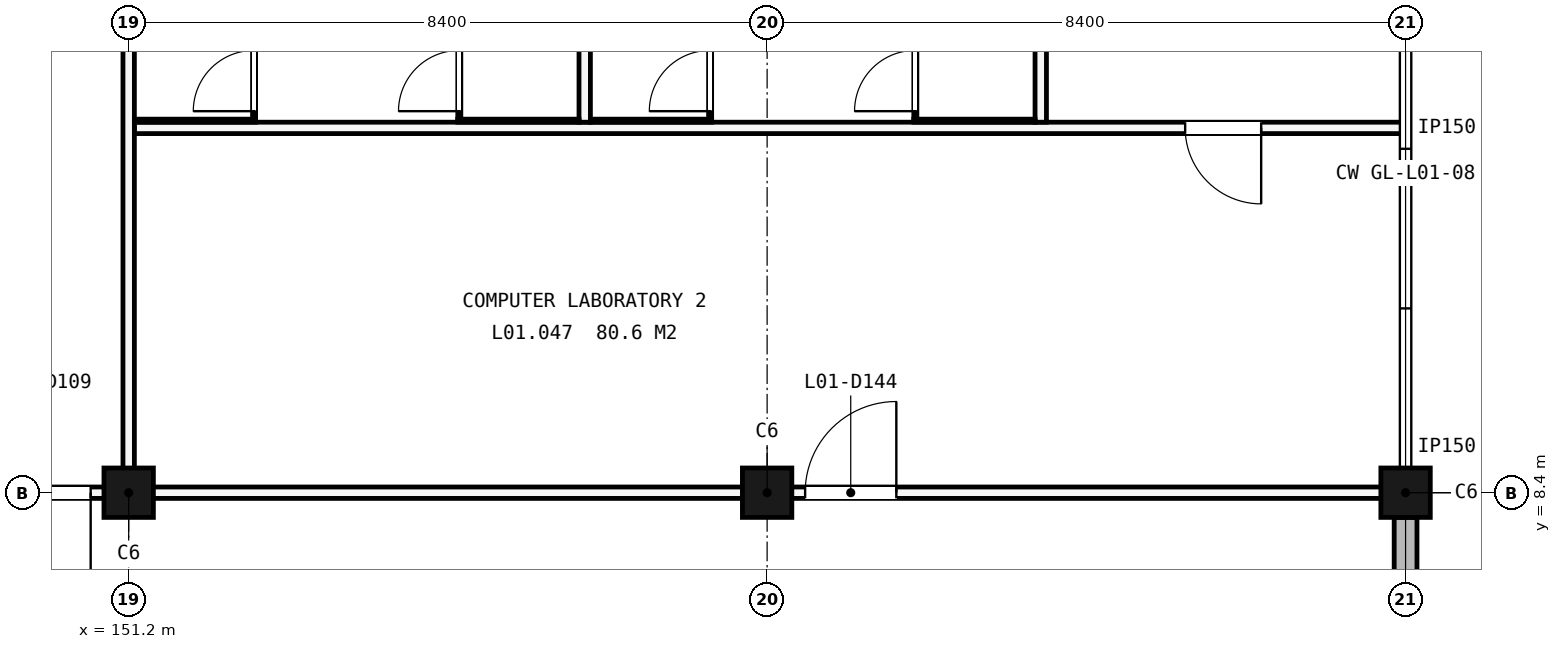
"""IFC4 building model, lengths in metres.
Left out: names, types, materials, properties, quantities, classifications, styles, units other than length and angle.
Written with IfcOpenShell. Run it as: python <this file> out.ifc"""

import sys

from ifc_helpers import new_model, si_unit, direction, frame, frame_2d, origin, origin_2d, place, context, subcontext, project, spatial, rectangle, extrude, element, fill, save


model = new_model("IFC4")
c1 = context("Model", 3, precision=1e-05, world=origin(), true_north=direction((0.0, 1.0)))
c2 = subcontext(c1, "Body", "Model", "MODEL_VIEW")
j1 = project(units=[si_unit("LENGTHUNIT", "METRE"), si_unit("PLANEANGLEUNIT", "RADIAN")], contexts=[c1])
p1 = place(None, origin())
s1 = spatial("IfcSite", under=j1, at=p1, CompositionType="ELEMENT")
p2 = place(p1, origin())
s2 = spatial("IfcBuilding", under=s1, at=p2, CompositionType="ELEMENT")
p3 = place(p2, frame((0.0, 0.0, 5.4)))
s3 = spatial("IfcBuildingStorey", under=s2, at=p3, CompositionType="ELEMENT", Elevation=5.4)
for number, where, z_axis, x_axis in (
    (1, (151.2, 8.4, -0.3), (0.0, 0.0, 1.0), (1.0, 0.0, 0.0)),
    (2, (159.6, 8.4, -0.3), (0.0, 0.0, 1.0), (1.0, 0.0, 0.0)),
    (3, (168.0, 8.4, -0.3), (0.0, 0.0, 1.0), (1.0, 0.0, 0.0)),
):
    element("IfcColumn", number, at=place(p3, frame(where, z_axis=z_axis, x_axis=x_axis)), inside=s3, PredefinedType="COLUMN", context=c2, shape_type="SweptSolid", body=[
        extrude(rectangle(XDim=0.65, YDim=0.65, at=origin_2d()), origin(), (0.0, 0.0, 1.0), 4.55),
    ])
p4 = place(p3, frame((168.0, 0.225, 0.0), z_axis=(0.0, 0.0, 1.0), x_axis=(0.0, 1.0, 0.0)))
e4 = element("IfcWall", 4, at=p4, inside=s3, PredefinedType="STANDARD", context=c2, shape_type="SweptSolid", body=[
    extrude(rectangle(XDim=7.85, YDim=0.3, at=frame_2d((3.925, 0.0))), origin(), (0.0, 0.0, 1.0), 4.2),
])
p5 = place(p3, frame((92.705, 8.4, 0.0), z_axis=(0.0, 0.0, 1.0), x_axis=(1.0, 0.0, 0.0)))
e5 = element("IfcWall", 5, at=p5, inside=s3, PredefinedType="PARTITIONING", context=c2, shape_type="SweptSolid", body=[
    extrude(rectangle(XDim=75.295, YDim=0.15, at=frame_2d((37.647, 0.0))), origin(), (0.0, 0.0, 1.0), 3.5),
])
p6 = place(p5, frame((0.195, 0.0, 0.0)))
e6 = element("IfcOpeningElement", 6, at=p6, cuts=e5, PredefinedType="OPENING", context=c2, shape_type="SweptSolid", body=[
    extrude(rectangle(XDim=1.2, YDim=2.1, at=frame_2d((0.6, 1.05))), frame((0.0, 0.085, 0.0), z_axis=(0.0, -1.0, 0.0), x_axis=(1.0, 0.0, 0.0)), (0.0, 0.0, 1.0), 0.17),
])
p7 = place(p5, frame((23.195, 0.0, 0.0)))
e7 = element("IfcOpeningElement", 7, at=p7, cuts=e5, PredefinedType="OPENING", context=c2, shape_type="SweptSolid", body=[
    extrude(rectangle(XDim=1.2, YDim=2.1, at=frame_2d((0.6, 1.05))), frame((0.0, 0.085, 0.0), z_axis=(0.0, -1.0, 0.0), x_axis=(1.0, 0.0, 0.0)), (0.0, 0.0, 1.0), 0.17),
])
p8 = place(p5, frame((25.395, 0.0, 0.0)))
e8 = element("IfcOpeningElement", 8, at=p8, cuts=e5, PredefinedType="OPENING", context=c2, shape_type="SweptSolid", body=[
    extrude(rectangle(XDim=1.2, YDim=2.1, at=frame_2d((0.6, 1.05))), frame((0.0, 0.085, 0.0), z_axis=(0.0, -1.0, 0.0), x_axis=(1.0, 0.0, 0.0)), (0.0, 0.0, 1.0), 0.17),
])
p9 = place(p5, frame((39.995, 0.0, 0.0)))
e9 = element("IfcOpeningElement", 9, at=p9, cuts=e5, PredefinedType="OPENING", context=c2, shape_type="SweptSolid", body=[
    extrude(rectangle(XDim=1.2, YDim=2.1, at=frame_2d((0.6, 1.05))), frame((0.0, 0.085, 0.0), z_axis=(0.0, -1.0, 0.0), x_axis=(1.0, 0.0, 0.0)), (0.0, 0.0, 1.0), 0.17),
])
p10 = place(p5, frame((42.195, 0.0, 0.0)))
e10 = element("IfcOpeningElement", 10, at=p10, cuts=e5, PredefinedType="OPENING", context=c2, shape_type="SweptSolid", body=[
    extrude(rectangle(XDim=1.2, YDim=2.1, at=frame_2d((0.6, 1.05))), frame((0.0, 0.085, 0.0), z_axis=(0.0, -1.0, 0.0), x_axis=(1.0, 0.0, 0.0)), (0.0, 0.0, 1.0), 0.17),
])
p11 = place(p5, frame((56.795, 0.0, 0.0)))
e11 = element("IfcOpeningElement", 11, at=p11, cuts=e5, PredefinedType="OPENING", context=c2, shape_type="SweptSolid", body=[
    extrude(rectangle(XDim=1.2, YDim=2.1, at=frame_2d((0.6, 1.05))), frame((0.0, 0.085, 0.0), z_axis=(0.0, -1.0, 0.0), x_axis=(1.0, 0.0, 0.0)), (0.0, 0.0, 1.0), 0.17),
])
p12 = place(p5, frame((67.395, 0.0, 0.0)))
e12 = element("IfcOpeningElement", 12, at=p12, cuts=e5, PredefinedType="OPENING", context=c2, shape_type="SweptSolid", body=[
    extrude(rectangle(XDim=1.2, YDim=2.1, at=frame_2d((0.6, 1.05))), frame((0.0, 0.085, 0.0), z_axis=(0.0, -1.0, 0.0), x_axis=(1.0, 0.0, 0.0)), (0.0, 0.0, 1.0), 0.17),
])
p13 = place(p3, frame((151.275, 13.2, 0.0), z_axis=(0.0, 0.0, 1.0), x_axis=(1.0, 0.0, 0.0)))
e13 = element("IfcWall", 13, at=p13, inside=s3, PredefinedType="PARTITIONING", context=c2, shape_type="SweptSolid", body=[
    extrude(rectangle(XDim=16.725, YDim=0.15, at=frame_2d((8.363, 0.0))), origin(), (0.0, 0.0, 1.0), 4.2),
])
p14 = place(p13, frame((13.825, 0.0, 0.0)))
e14 = element("IfcOpeningElement", 14, at=p14, cuts=e13, PredefinedType="OPENING", context=c2, shape_type="SweptSolid", body=[
    extrude(rectangle(XDim=1.0, YDim=2.1, at=frame_2d((0.5, 1.05))), frame((0.0, 0.085, 0.0), z_axis=(0.0, -1.0, 0.0), x_axis=(1.0, 0.0, 0.0)), (0.0, 0.0, 1.0), 0.17),
])
p15 = place(p3, frame((151.2, 8.475, 0.0), z_axis=(0.0, 0.0, 1.0), x_axis=(0.0, 1.0, 0.0)))
e15 = element("IfcWall", 15, at=p15, inside=s3, PredefinedType="PARTITIONING", context=c2, shape_type="SweptSolid", body=[
    extrude(rectangle(XDim=16.65, YDim=0.15, at=frame_2d((8.325, 0.0))), origin(), (0.0, 0.0, 1.0), 3.5),
])
p16 = place(p15, frame((14.925, 0.0, 0.0)))
e16 = element("IfcOpeningElement", 16, at=p16, cuts=e15, PredefinedType="OPENING", context=c2, shape_type="SweptSolid", body=[
    extrude(rectangle(XDim=1.2, YDim=2.1, at=frame_2d((0.6, 1.05))), frame((0.0, 0.085, 0.0), z_axis=(0.0, -1.0, 0.0), x_axis=(1.0, 0.0, 0.0)), (0.0, 0.0, 1.0), 0.17),
])
for number, where, z_axis, x_axis in (
    (17, (157.2, 13.275, 0.0), (0.0, 0.0, 1.0), (0.0, 1.0, 0.0)),
    (18, (163.2, 13.275, 0.0), (0.0, 0.0, 1.0), (0.0, 1.0, 0.0)),
):
    element("IfcWall", number, at=place(p3, frame(where, z_axis=z_axis, x_axis=x_axis)), inside=s3, PredefinedType="PARTITIONING", context=c2, shape_type="SweptSolid", body=[
        extrude(rectangle(XDim=9.45, YDim=0.15, at=frame_2d((4.725, 0.0))), origin(), (0.0, 0.0, 1.0), 4.2),
    ])
p17 = place(p3, frame((151.275, 13.295, 0.0), z_axis=(0.0, 0.0, 1.0), x_axis=(1.0, 0.0, 0.0)))
e19 = element("IfcWall", 19, at=p17, inside=s3, PredefinedType="PARTITIONING", context=c2, shape_type="SweptSolid", body=[
    extrude(rectangle(XDim=1.595, YDim=0.04, at=frame_2d((0.798, 0.0))), origin(), (0.0, 0.0, 1.0), 2.0),
])
p18 = place(p3, frame((152.85, 13.315, 0.0), z_axis=(0.0, 0.0, 1.0), x_axis=(0.0, 1.0, 0.0)))
e20 = element("IfcWall", 20, at=p18, inside=s3, PredefinedType="PARTITIONING", context=c2, shape_type="SweptSolid", body=[
    extrude(rectangle(XDim=0.955, YDim=0.04, at=frame_2d((0.478, 0.0))), origin(), (0.0, 0.0, 1.0), 2.0),
])
p19 = place(p18, frame((0.105, 0.0, 0.0)))
e21 = element("IfcOpeningElement", 21, at=p19, cuts=e20, PredefinedType="OPENING", context=c2, shape_type="SweptSolid", body=[
    extrude(rectangle(XDim=0.8, YDim=2.0, at=frame_2d((0.4, 1.0))), frame((0.0, 0.03, 0.0), z_axis=(0.0, -1.0, 0.0), x_axis=(1.0, 0.0, 0.0)), (0.0, 0.0, 1.0), 0.06),
])
p20 = place(p3, frame((157.125, 13.295, 0.0), z_axis=(0.0, 0.0, 1.0), x_axis=(-1.0, 0.0, 0.0)))
e22 = element("IfcWall", 22, at=p20, inside=s3, PredefinedType="PARTITIONING", context=c2, shape_type="SweptSolid", body=[
    extrude(rectangle(XDim=1.595, YDim=0.04, at=frame_2d((0.797, 0.0))), origin(), (0.0, 0.0, 1.0), 2.0),
])
p21 = place(p3, frame((155.55, 13.315, 0.0), z_axis=(0.0, 0.0, 1.0), x_axis=(0.0, 1.0, 0.0)))
e23 = element("IfcWall", 23, at=p21, inside=s3, PredefinedType="PARTITIONING", context=c2, shape_type="SweptSolid", body=[
    extrude(rectangle(XDim=0.955, YDim=0.04, at=frame_2d((0.478, 0.0))), origin(), (0.0, 0.0, 1.0), 2.0),
])
p22 = place(p21, frame((0.105, 0.0, 0.0)))
e24 = element("IfcOpeningElement", 24, at=p22, cuts=e23, PredefinedType="OPENING", context=c2, shape_type="SweptSolid", body=[
    extrude(rectangle(XDim=0.8, YDim=2.0, at=frame_2d((0.4, 1.0))), frame((0.0, 0.03, 0.0), z_axis=(0.0, -1.0, 0.0), x_axis=(1.0, 0.0, 0.0)), (0.0, 0.0, 1.0), 0.06),
])
p23 = place(p3, frame((157.275, 13.295, 0.0), z_axis=(0.0, 0.0, 1.0), x_axis=(1.0, 0.0, 0.0)))
e25 = element("IfcWall", 25, at=p23, inside=s3, PredefinedType="PARTITIONING", context=c2, shape_type="SweptSolid", body=[
    extrude(rectangle(XDim=1.595, YDim=0.04, at=frame_2d((0.798, 0.0))), origin(), (0.0, 0.0, 1.0), 2.0),
])
p24 = place(p3, frame((158.85, 13.315, 0.0), z_axis=(0.0, 0.0, 1.0), x_axis=(0.0, 1.0, 0.0)))
e26 = element("IfcWall", 26, at=p24, inside=s3, PredefinedType="PARTITIONING", context=c2, shape_type="SweptSolid", body=[
    extrude(rectangle(XDim=0.955, YDim=0.04, at=frame_2d((0.478, 0.0))), origin(), (0.0, 0.0, 1.0), 2.0),
])
p25 = place(p24, frame((0.105, 0.0, 0.0)))
e27 = element("IfcOpeningElement", 27, at=p25, cuts=e26, PredefinedType="OPENING", context=c2, shape_type="SweptSolid", body=[
    extrude(rectangle(XDim=0.8, YDim=2.0, at=frame_2d((0.4, 1.0))), frame((0.0, 0.03, 0.0), z_axis=(0.0, -1.0, 0.0), x_axis=(1.0, 0.0, 0.0)), (0.0, 0.0, 1.0), 0.06),
])
p26 = place(p3, frame((163.125, 13.295, 0.0), z_axis=(0.0, 0.0, 1.0), x_axis=(-1.0, 0.0, 0.0)))
e28 = element("IfcWall", 28, at=p26, inside=s3, PredefinedType="PARTITIONING", context=c2, shape_type="SweptSolid", body=[
    extrude(rectangle(XDim=1.595, YDim=0.04, at=frame_2d((0.797, 0.0))), origin(), (0.0, 0.0, 1.0), 2.0),
])
p27 = place(p3, frame((161.55, 13.315, 0.0), z_axis=(0.0, 0.0, 1.0), x_axis=(0.0, 1.0, 0.0)))
e29 = element("IfcWall", 29, at=p27, inside=s3, PredefinedType="PARTITIONING", context=c2, shape_type="SweptSolid", body=[
    extrude(rectangle(XDim=0.955, YDim=0.04, at=frame_2d((0.478, 0.0))), origin(), (0.0, 0.0, 1.0), 2.0),
])
p28 = place(p27, frame((0.105, 0.0, 0.0)))
e30 = element("IfcOpeningElement", 30, at=p28, cuts=e29, PredefinedType="OPENING", context=c2, shape_type="SweptSolid", body=[
    extrude(rectangle(XDim=0.8, YDim=2.0, at=frame_2d((0.4, 1.0))), frame((0.0, 0.03, 0.0), z_axis=(0.0, -1.0, 0.0), x_axis=(1.0, 0.0, 0.0)), (0.0, 0.0, 1.0), 0.06),
])
p29 = place(p11, origin())
e31 = element("IfcDoor", 31, at=p29, inside=s3, OperationType="SINGLE_SWING_RIGHT", PredefinedType="DOOR", context=c2, shape_type="SweptSolid", body=[
    extrude(rectangle(XDim=1.2, YDim=2.1, at=frame_2d((0.6, 1.05))), frame((0.0, 0.025, 0.0), z_axis=(0.0, -1.0, 0.0), x_axis=(1.0, 0.0, 0.0)), (0.0, 0.0, 1.0), 0.05),
])
fill(e11, e31)
p30 = place(p12, origin())
e32 = element("IfcDoor", 32, at=p30, inside=s3, OperationType="SINGLE_SWING_LEFT", PredefinedType="DOOR", context=c2, shape_type="SweptSolid", body=[
    extrude(rectangle(XDim=1.2, YDim=2.1, at=frame_2d((0.6, 1.05))), frame((0.0, 0.025, 0.0), z_axis=(0.0, -1.0, 0.0), x_axis=(1.0, 0.0, 0.0)), (0.0, 0.0, 1.0), 0.05),
])
fill(e12, e32)
p31 = place(p14, origin())
e33 = element("IfcDoor", 33, at=p31, inside=s3, OperationType="SINGLE_SWING_RIGHT", PredefinedType="DOOR", context=c2, shape_type="SweptSolid", body=[
    extrude(rectangle(XDim=1.0, YDim=2.1, at=frame_2d((0.5, 1.05))), frame((0.0, 0.025, 0.0), z_axis=(0.0, -1.0, 0.0), x_axis=(1.0, 0.0, 0.0)), (0.0, 0.0, 1.0), 0.05),
])
fill(e14, e33)
p32 = place(p19, origin())
e34 = element("IfcDoor", 34, at=p32, inside=s3, OperationType="SINGLE_SWING_LEFT", PredefinedType="DOOR", context=c2, shape_type="SweptSolid", body=[
    extrude(rectangle(XDim=0.8, YDim=2.0, at=frame_2d((0.4, 1.0))), frame((0.0, 0.02, 0.0), z_axis=(0.0, -1.0, 0.0), x_axis=(1.0, 0.0, 0.0)), (0.0, 0.0, 1.0), 0.04),
])
fill(e21, e34)
p33 = place(p22, origin())
e35 = element("IfcDoor", 35, at=p33, inside=s3, OperationType="SINGLE_SWING_LEFT", PredefinedType="DOOR", context=c2, shape_type="SweptSolid", body=[
    extrude(rectangle(XDim=0.8, YDim=2.0, at=frame_2d((0.4, 1.0))), frame((0.0, 0.02, 0.0), z_axis=(0.0, -1.0, 0.0), x_axis=(1.0, 0.0, 0.0)), (0.0, 0.0, 1.0), 0.04),
])
fill(e24, e35)
p34 = place(p25, origin())
e36 = element("IfcDoor", 36, at=p34, inside=s3, OperationType="SINGLE_SWING_LEFT", PredefinedType="DOOR", context=c2, shape_type="SweptSolid", body=[
    extrude(rectangle(XDim=0.8, YDim=2.0, at=frame_2d((0.4, 1.0))), frame((0.0, 0.02, 0.0), z_axis=(0.0, -1.0, 0.0), x_axis=(1.0, 0.0, 0.0)), (0.0, 0.0, 1.0), 0.04),
])
fill(e27, e36)
p35 = place(p28, origin())
e37 = element("IfcDoor", 37, at=p35, inside=s3, OperationType="SINGLE_SWING_LEFT", PredefinedType="DOOR", context=c2, shape_type="SweptSolid", body=[
    extrude(rectangle(XDim=0.8, YDim=2.0, at=frame_2d((0.4, 1.0))), frame((0.0, 0.02, 0.0), z_axis=(0.0, -1.0, 0.0), x_axis=(1.0, 0.0, 0.0)), (0.0, 0.0, 1.0), 0.04),
])
fill(e30, e37)
save(model, sys.argv[1])
